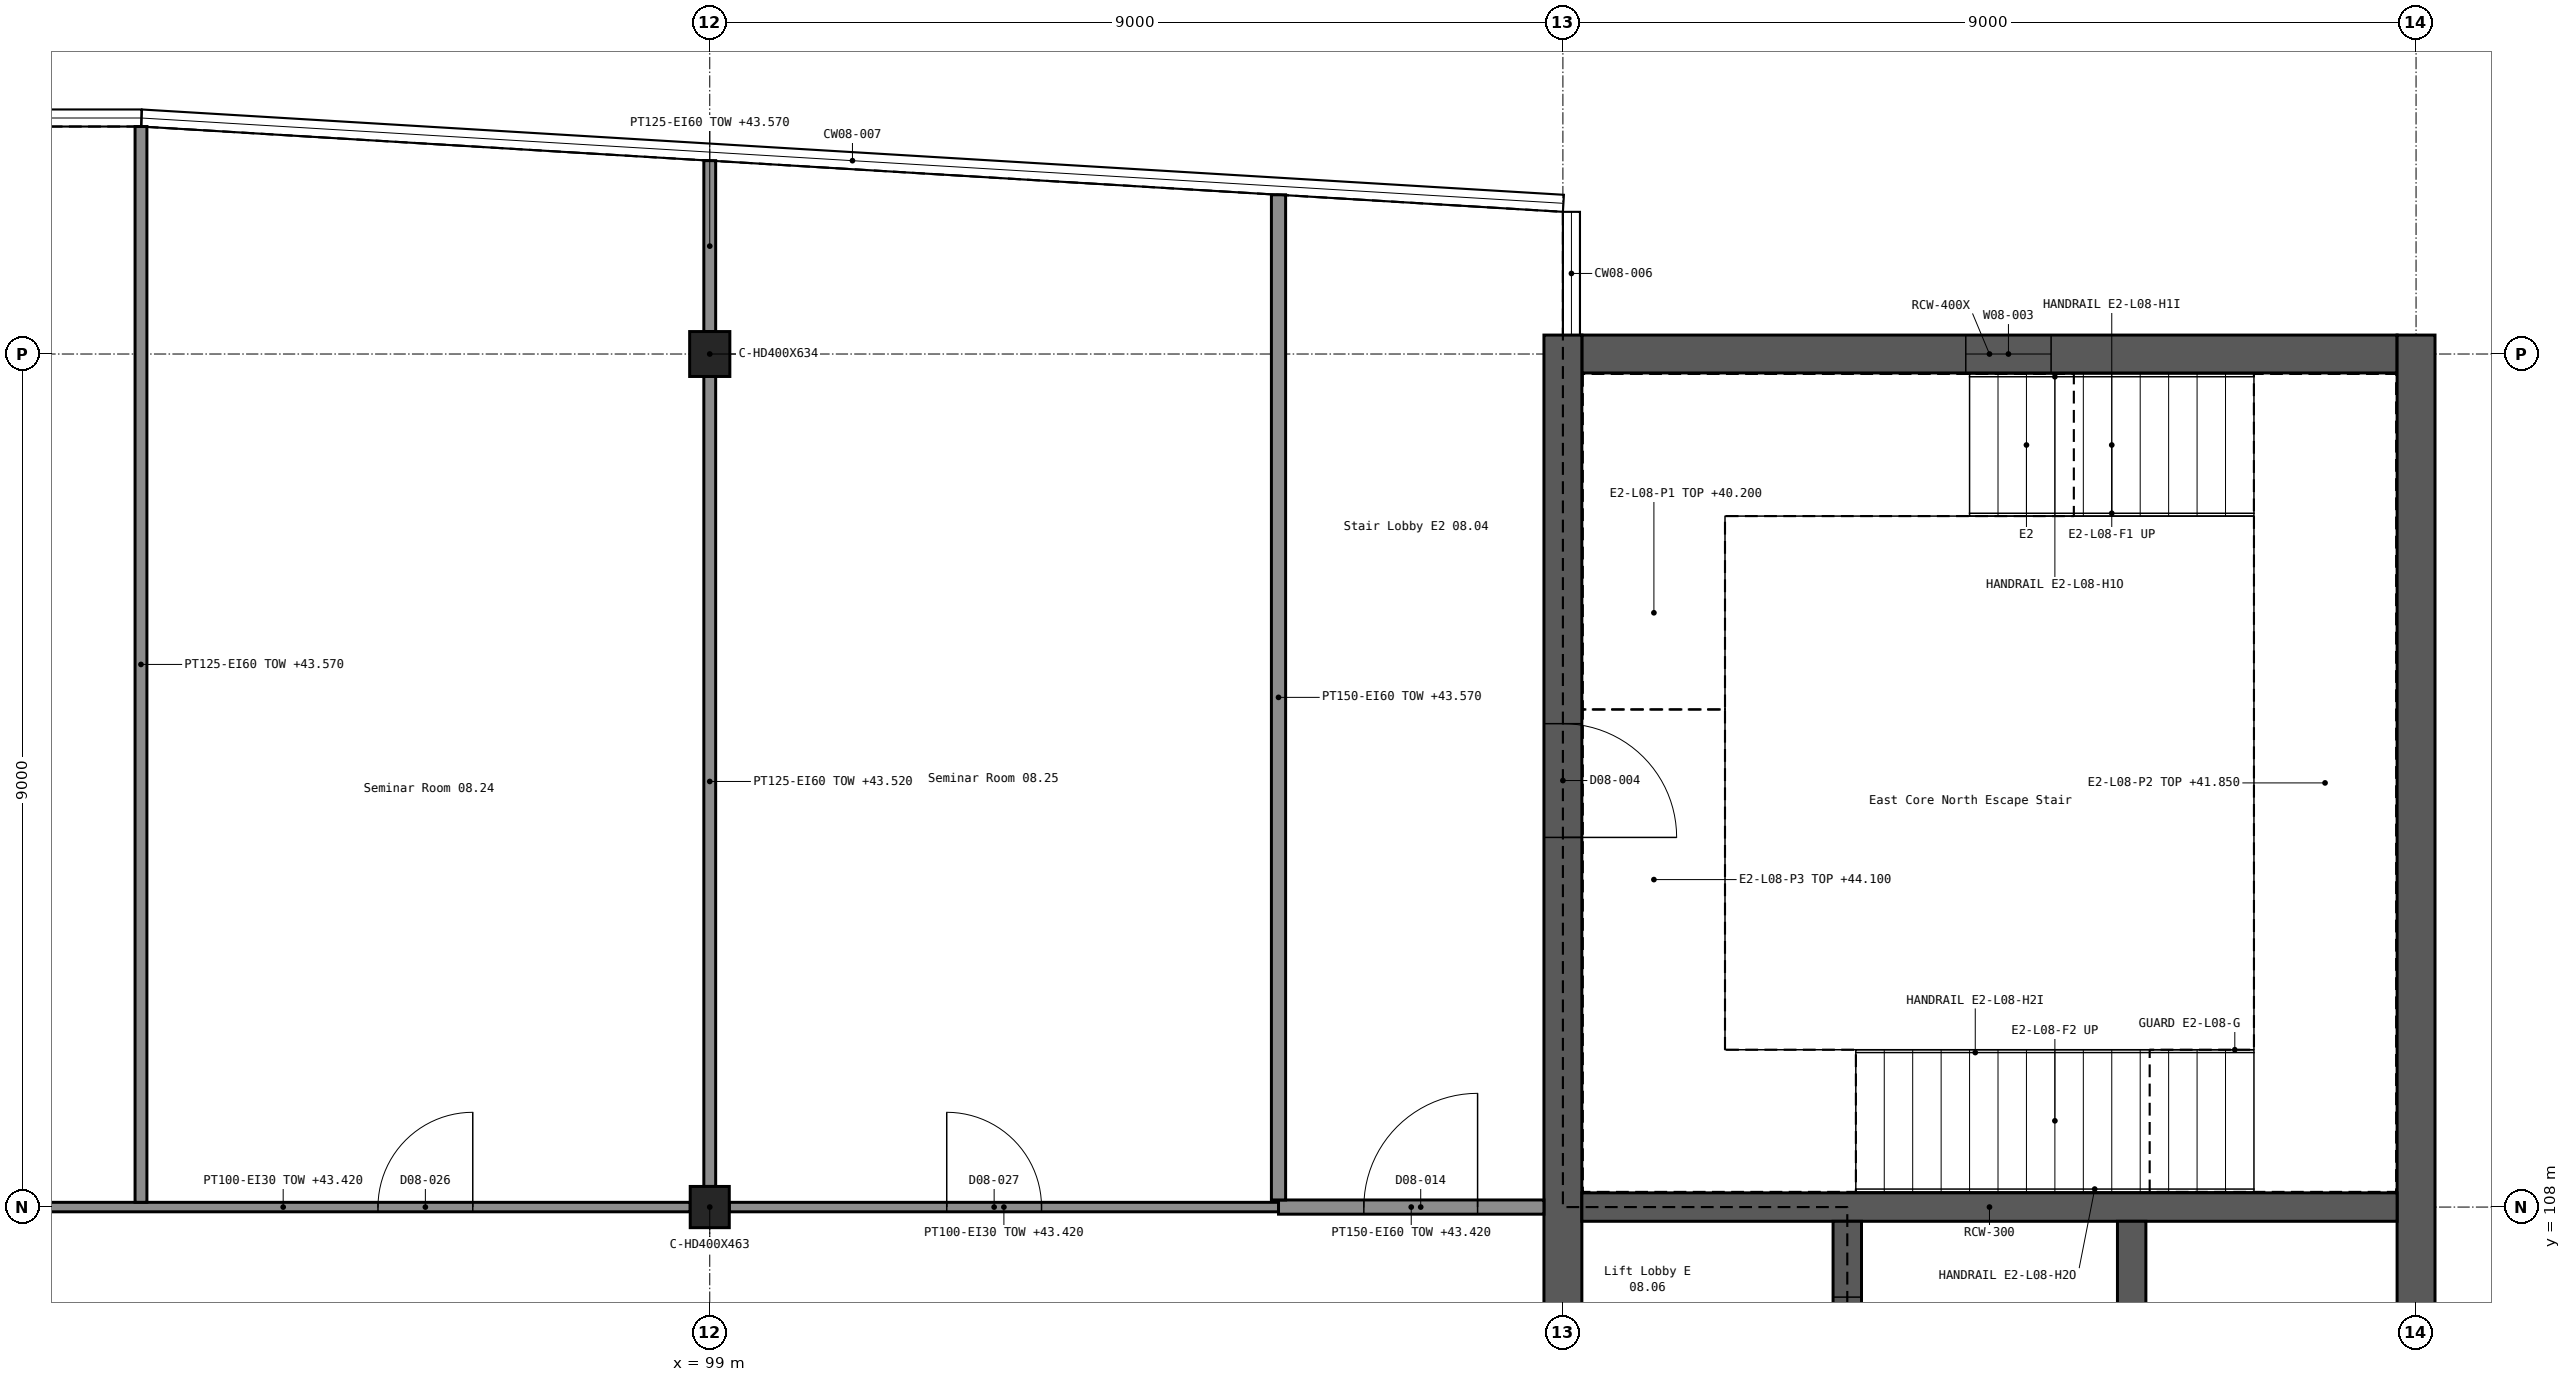
"""IFC4 building model, lengths in metres.
Left out: names, types, materials, properties, quantities, classifications, styles, units other than length and angle.
Written with IfcOpenShell. Run it as: python <this file> out.ifc"""

import sys

from ifc_helpers import new_model, si_unit, direction, frame, frame_2d, origin, origin_2d, place, context, subcontext, project, spatial, rectangle, i_section, extrude, element, fill, save


model = new_model("IFC4")
c1 = context("Model", 3, precision=1e-05, world=origin(), true_north=direction((0.0, 1.0)))
c2 = subcontext(c1, "Body", "Model", "MODEL_VIEW")
j1 = project(units=[si_unit("LENGTHUNIT", "METRE"), si_unit("PLANEANGLEUNIT", "RADIAN")], contexts=[c1])
p1 = place(None, origin())
s1 = spatial("IfcSite", under=j1, at=p1, CompositionType="ELEMENT")
p2 = place(p1, origin())
s2 = spatial("IfcBuilding", under=s1, at=p2, CompositionType="ELEMENT")
p3 = place(p2, frame((0.0, 0.0, 40.2)))
s3 = spatial("IfcBuildingStorey", under=s2, at=p3, CompositionType="ELEMENT", Elevation=40.2)
p4 = place(p3, frame((108.2, 117.0, 0.0), z_axis=(0.0, 0.0, 1.0), x_axis=(1.0, 0.0, 0.0)))
e1 = element("IfcWall", 1, at=p4, inside=s3, PredefinedType="SHEAR", context=c2, shape_type="SweptSolid", body=[
    extrude(rectangle(XDim=8.6, YDim=0.4, at=frame_2d((4.3, 0.0))), origin(), (0.0, 0.0, 1.0), 3.9),
])
p5 = place(p4, frame((4.05, 0.0, 1.2)))
e2 = element("IfcOpeningElement", 2, at=p5, cuts=e1, PredefinedType="OPENING", context=c2, shape_type="SweptSolid", body=[
    extrude(rectangle(XDim=0.9, YDim=1.5, at=frame_2d((0.45, 0.75))), frame((0.0, 0.211, 0.0), z_axis=(0.0, -1.0, 0.0), x_axis=(1.0, 0.0, 0.0)), (0.0, 0.0, 1.0), 0.422),
])
p6 = place(p3, frame((108.0, 89.8, 0.0), z_axis=(0.0, 0.0, 1.0), x_axis=(0.0, 1.0, 0.0)))
e3 = element("IfcWall", 3, at=p6, inside=s3, PredefinedType="SHEAR", context=c2, shape_type="SweptSolid", body=[
    extrude(rectangle(XDim=27.4, YDim=0.4, at=frame_2d((13.7, 0.0))), origin(), (0.0, 0.0, 1.0), 3.9),
])
p7 = place(p6, frame((4.1, 0.0, 0.0)))
e4 = element("IfcOpeningElement", 4, at=p7, cuts=e3, PredefinedType="OPENING", context=c2, shape_type="SweptSolid", body=[
    extrude(rectangle(XDim=1.2, YDim=2.1, at=frame_2d((0.6, 1.05))), frame((0.0, 0.211, 0.0), z_axis=(0.0, -1.0, 0.0), x_axis=(1.0, 0.0, 0.0)), (0.0, 0.0, 1.0), 0.422),
])
p8 = place(p6, frame((22.1, 0.0, 0.0)))
e5 = element("IfcOpeningElement", 5, at=p8, cuts=e3, PredefinedType="OPENING", context=c2, shape_type="SweptSolid", body=[
    extrude(rectangle(XDim=1.2, YDim=2.1, at=frame_2d((0.6, 1.05))), frame((0.0, 0.211, 0.0), z_axis=(0.0, -1.0, 0.0), x_axis=(1.0, 0.0, 0.0)), (0.0, 0.0, 1.0), 0.422),
])
p9 = place(p6, frame((12.5, 0.0, 0.0)))
e6 = element("IfcOpeningElement", 6, at=p9, cuts=e3, PredefinedType="OPENING", context=c2, shape_type="SweptSolid", body=[
    extrude(rectangle(XDim=2.0, YDim=2.1, at=frame_2d((1.0, 1.05))), frame((0.0, 0.211, 0.0), z_axis=(0.0, -1.0, 0.0), x_axis=(1.0, 0.0, 0.0)), (0.0, 0.0, 1.0), 0.422),
])
p10 = place(p3, frame((117.0, 89.8, 0.0), z_axis=(0.0, 0.0, 1.0), x_axis=(0.0, 1.0, 0.0)))
e7 = element("IfcWall", 7, at=p10, inside=s3, PredefinedType="SHEAR", context=c2, shape_type="SweptSolid", body=[
    extrude(rectangle(XDim=27.4, YDim=0.4, at=frame_2d((13.7, 0.0))), origin(), (0.0, 0.0, 1.0), 3.9),
])
p11 = place(p3, frame((108.2, 108.0, 0.0), z_axis=(0.0, 0.0, 1.0), x_axis=(1.0, 0.0, 0.0)))
e8 = element("IfcWall", 8, at=p11, inside=s3, PredefinedType="SHEAR", context=c2, shape_type="SweptSolid", body=[
    extrude(rectangle(XDim=8.6, YDim=0.3, at=frame_2d((4.3, 0.0))), origin(), (0.0, 0.0, 1.0), 3.9),
])
p12 = place(p3, frame((111.0, 99.15, 0.0), z_axis=(0.0, 0.0, 1.0), x_axis=(0.0, 1.0, 0.0)))
e9 = element("IfcWall", 9, at=p12, inside=s3, PredefinedType="SHEAR", context=c2, shape_type="SweptSolid", body=[
    extrude(rectangle(XDim=8.7, YDim=0.3, at=frame_2d((4.35, 0.0))), origin(), (0.0, 0.0, 1.0), 3.9),
])
p13 = place(p12, frame((0.8, 0.0, 0.0)))
e10 = element("IfcOpeningElement", 10, at=p13, cuts=e9, PredefinedType="OPENING", context=c2, shape_type="SweptSolid", body=[
    extrude(rectangle(XDim=1.1, YDim=2.1, at=frame_2d((0.55, 1.05))), frame((0.0, 0.161, 0.0), z_axis=(0.0, -1.0, 0.0), x_axis=(1.0, 0.0, 0.0)), (0.0, 0.0, 1.0), 0.322),
])
p14 = place(p12, frame((3.8, 0.0, 0.0)))
e11 = element("IfcOpeningElement", 11, at=p14, cuts=e9, PredefinedType="OPENING", context=c2, shape_type="SweptSolid", body=[
    extrude(rectangle(XDim=1.1, YDim=2.1, at=frame_2d((0.55, 1.05))), frame((0.0, 0.161, 0.0), z_axis=(0.0, -1.0, 0.0), x_axis=(1.0, 0.0, 0.0)), (0.0, 0.0, 1.0), 0.322),
])
p15 = place(p12, frame((6.8, 0.0, 0.0)))
e12 = element("IfcOpeningElement", 12, at=p15, cuts=e9, PredefinedType="OPENING", context=c2, shape_type="SweptSolid", body=[
    extrude(rectangle(XDim=1.1, YDim=2.1, at=frame_2d((0.55, 1.05))), frame((0.0, 0.161, 0.0), z_axis=(0.0, -1.0, 0.0), x_axis=(1.0, 0.0, 0.0)), (0.0, 0.0, 1.0), 0.322),
])
p16 = place(p3, frame((114.0, 99.15, 0.0), z_axis=(0.0, 0.0, 1.0), x_axis=(0.0, 1.0, 0.0)))
e13 = element("IfcWall", 13, at=p16, inside=s3, PredefinedType="SHEAR", context=c2, shape_type="SweptSolid", body=[
    extrude(rectangle(XDim=8.7, YDim=0.3, at=frame_2d((4.35, 0.0))), origin(), (0.0, 0.0, 1.0), 3.9),
])
p17 = place(p3, frame((99.0, 108.0, 0.0), z_axis=(0.0, 0.0, 1.0), x_axis=(1.0, 0.0, 0.0)))
e14 = element("IfcColumn", 14, at=p17, inside=s3, PredefinedType="COLUMN", context=c2, shape_type="SweptSolid", body=[
    extrude(i_section(OverallWidth=0.412, OverallDepth=0.435, WebThickness=0.036, FlangeThickness=0.057, FilletRadius=0.015, at=origin_2d()), origin(), (0.0, 0.0, 1.0), 3.9),
])
p18 = place(p3, frame((99.0, 117.0, 0.0), z_axis=(0.0, 0.0, 1.0), x_axis=(1.0, 0.0, 0.0)))
e15 = element("IfcColumn", 15, at=p18, inside=s3, PredefinedType="COLUMN", context=c2, shape_type="SweptSolid", body=[
    extrude(i_section(OverallWidth=0.424, OverallDepth=0.474, WebThickness=0.048, FlangeThickness=0.077, FilletRadius=0.015, at=origin_2d()), origin(), (0.0, 0.0, 1.0), 3.9),
])
p19 = place(p3, frame((90.206, 108.0, 0.0), z_axis=(0.0, 0.0, 1.0), x_axis=(1.0, 0.0, 0.0)))
e16 = element("IfcWall", 16, at=p19, inside=s3, PredefinedType="PARTITIONING", context=c2, shape_type="SweptSolid", body=[
    extrude(rectangle(XDim=8.588, YDim=0.1, at=frame_2d((4.294, 0.0))), origin(), (0.0, 0.0, 1.0), 3.22),
])
p20 = place(p19, frame((0.544, 0.0, 0.0)))
e17 = element("IfcOpeningElement", 17, at=p20, cuts=e16, PredefinedType="OPENING", context=c2, shape_type="SweptSolid", body=[
    extrude(rectangle(XDim=1.0, YDim=2.1, at=frame_2d((0.5, 1.05))), frame((0.0, 0.061, 0.0), z_axis=(0.0, -1.0, 0.0), x_axis=(1.0, 0.0, 0.0)), (0.0, 0.0, 1.0), 0.122),
])
p21 = place(p19, frame((5.294, 0.0, 0.0)))
e18 = element("IfcOpeningElement", 18, at=p21, cuts=e16, PredefinedType="OPENING", context=c2, shape_type="SweptSolid", body=[
    extrude(rectangle(XDim=1.0, YDim=2.1, at=frame_2d((0.5, 1.05))), frame((0.0, 0.061, 0.0), z_axis=(0.0, -1.0, 0.0), x_axis=(1.0, 0.0, 0.0)), (0.0, 0.0, 1.0), 0.122),
])
p22 = place(p3, frame((99.206, 108.0, 0.0), z_axis=(0.0, 0.0, 1.0), x_axis=(1.0, 0.0, 0.0)))
e19 = element("IfcWall", 19, at=p22, inside=s3, PredefinedType="PARTITIONING", context=c2, shape_type="SweptSolid", body=[
    extrude(rectangle(XDim=5.794, YDim=0.1, at=frame_2d((2.897, 0.0))), origin(), (0.0, 0.0, 1.0), 3.22),
])
p23 = place(p22, frame((2.294, 0.0, 0.0)))
e20 = element("IfcOpeningElement", 20, at=p23, cuts=e19, PredefinedType="OPENING", context=c2, shape_type="SweptSolid", body=[
    extrude(rectangle(XDim=1.0, YDim=2.1, at=frame_2d((0.5, 1.05))), frame((0.0, 0.061, 0.0), z_axis=(0.0, -1.0, 0.0), x_axis=(1.0, 0.0, 0.0)), (0.0, 0.0, 1.0), 0.122),
])
p24 = place(p3, frame((105.0, 108.0, 0.0), z_axis=(0.0, 0.0, 1.0), x_axis=(1.0, 0.0, 0.0)))
e21 = element("IfcWall", 21, at=p24, inside=s3, PredefinedType="PARTITIONING", context=c2, shape_type="SweptSolid", body=[
    extrude(rectangle(XDim=2.8, YDim=0.15, at=frame_2d((1.4, 0.0))), origin(), (0.0, 0.0, 1.0), 3.22),
])
p25 = place(p24, frame((0.9, 0.0, 0.0)))
e22 = element("IfcOpeningElement", 22, at=p25, cuts=e21, PredefinedType="OPENING", context=c2, shape_type="SweptSolid", body=[
    extrude(rectangle(XDim=1.2, YDim=2.1, at=frame_2d((0.6, 1.05))), frame((0.0, 0.086, 0.0), z_axis=(0.0, -1.0, 0.0), x_axis=(1.0, 0.0, 0.0)), (0.0, 0.0, 1.0), 0.172),
])
p26 = place(p3, frame((93.0, 108.05, 0.0), z_axis=(0.0, 0.0, 1.0), x_axis=(0.0, 1.0, 0.0)))
e23 = element("IfcWall", 23, at=p26, inside=s3, PredefinedType="PARTITIONING", context=c2, shape_type="SweptSolid", body=[
    extrude(rectangle(XDim=11.35, YDim=0.125, at=frame_2d((5.675, 0.0))), origin(), (0.0, 0.0, 1.0), 3.37),
])
p27 = place(p3, frame((99.0, 108.218, 0.0), z_axis=(0.0, 0.0, 1.0), x_axis=(0.0, 1.0, 0.0)))
e24 = element("IfcWall", 24, at=p27, inside=s3, PredefinedType="PARTITIONING", context=c2, shape_type="SweptSolid", body=[
    extrude(rectangle(XDim=8.545, YDim=0.125, at=frame_2d((4.273, 0.0))), origin(), (0.0, 0.0, 1.0), 3.32),
])
p28 = place(p3, frame((99.0, 117.237, 0.0), z_axis=(0.0, 0.0, 1.0), x_axis=(0.0, 1.0, 0.0)))
e25 = element("IfcWall", 25, at=p28, inside=s3, PredefinedType="PARTITIONING", context=c2, shape_type="SweptSolid", body=[
    extrude(rectangle(XDim=1.803, YDim=0.125, at=frame_2d((0.901, 0.0))), origin(), (0.0, 0.0, 1.0), 3.37),
])
p29 = place(p3, frame((105.0, 108.075, 0.0), z_axis=(0.0, 0.0, 1.0), x_axis=(0.0, 1.0, 0.0)))
e26 = element("IfcWall", 26, at=p29, inside=s3, PredefinedType="PARTITIONING", context=c2, shape_type="SweptSolid", body=[
    extrude(rectangle(XDim=10.605, YDim=0.15, at=frame_2d((5.302, 0.0))), origin(), (0.0, 0.0, 1.0), 3.37),
])
p30 = place(p5, origin())
e27 = element("IfcWindow", 27, at=p30, inside=s3, PartitioningType="SINGLE_PANEL", PredefinedType="WINDOW", context=c2, shape_type="SweptSolid", body=[
    extrude(rectangle(XDim=0.9, YDim=1.5, at=frame_2d((0.45, 0.75))), frame((0.0, 0.03, 0.0), z_axis=(0.0, -1.0, 0.0), x_axis=(1.0, 0.0, 0.0)), (0.0, 0.0, 1.0), 0.06),
])
fill(e2, e27)
p31 = place(p8, frame((1.2, 0.0, 0.0), z_axis=(0.0, 0.0, 1.0), x_axis=(-1.0, 0.0, 0.0)))
e28 = element("IfcDoor", 28, at=p31, inside=s3, OperationType="SINGLE_SWING_RIGHT", PredefinedType="DOOR", context=c2, shape_type="SweptSolid", body=[
    extrude(rectangle(XDim=1.2, YDim=2.1, at=frame_2d((0.6, 1.05))), frame((0.0, 0.025, 0.0), z_axis=(0.0, -1.0, 0.0), x_axis=(1.0, 0.0, 0.0)), (0.0, 0.0, 1.0), 0.05),
])
fill(e5, e28)
p32 = place(p15, origin())
e29 = element("IfcDoor", 29, at=p32, inside=s3, OperationType="DOUBLE_DOOR_SLIDING", PredefinedType="DOOR", context=c2, shape_type="SweptSolid", body=[
    extrude(rectangle(XDim=1.1, YDim=2.1, at=frame_2d((0.55, 1.05))), frame((0.0, 0.025, 0.0), z_axis=(0.0, -1.0, 0.0), x_axis=(1.0, 0.0, 0.0)), (0.0, 0.0, 1.0), 0.05),
])
fill(e12, e29)
p33 = place(p25, origin())
e30 = element("IfcDoor", 30, at=p33, inside=s3, OperationType="SINGLE_SWING_RIGHT", PredefinedType="DOOR", context=c2, shape_type="SweptSolid", body=[
    extrude(rectangle(XDim=1.2, YDim=2.1, at=frame_2d((0.6, 1.05))), frame((0.0, 0.025, 0.0), z_axis=(0.0, -1.0, 0.0), x_axis=(1.0, 0.0, 0.0)), (0.0, 0.0, 1.0), 0.05),
])
fill(e22, e30)
p34 = place(p21, origin())
e31 = element("IfcDoor", 31, at=p34, inside=s3, OperationType="SINGLE_SWING_RIGHT", PredefinedType="DOOR", context=c2, shape_type="SweptSolid", body=[
    extrude(rectangle(XDim=1.0, YDim=2.1, at=frame_2d((0.5, 1.05))), frame((0.0, 0.025, 0.0), z_axis=(0.0, -1.0, 0.0), x_axis=(1.0, 0.0, 0.0)), (0.0, 0.0, 1.0), 0.05),
])
fill(e18, e31)
p35 = place(p23, origin())
e32 = element("IfcDoor", 32, at=p35, inside=s3, OperationType="SINGLE_SWING_LEFT", PredefinedType="DOOR", context=c2, shape_type="SweptSolid", body=[
    extrude(rectangle(XDim=1.0, YDim=2.1, at=frame_2d((0.5, 1.05))), frame((0.0, 0.025, 0.0), z_axis=(0.0, -1.0, 0.0), x_axis=(1.0, 0.0, 0.0)), (0.0, 0.0, 1.0), 0.05),
])
fill(e20, e32)
save(model, sys.argv[1])
